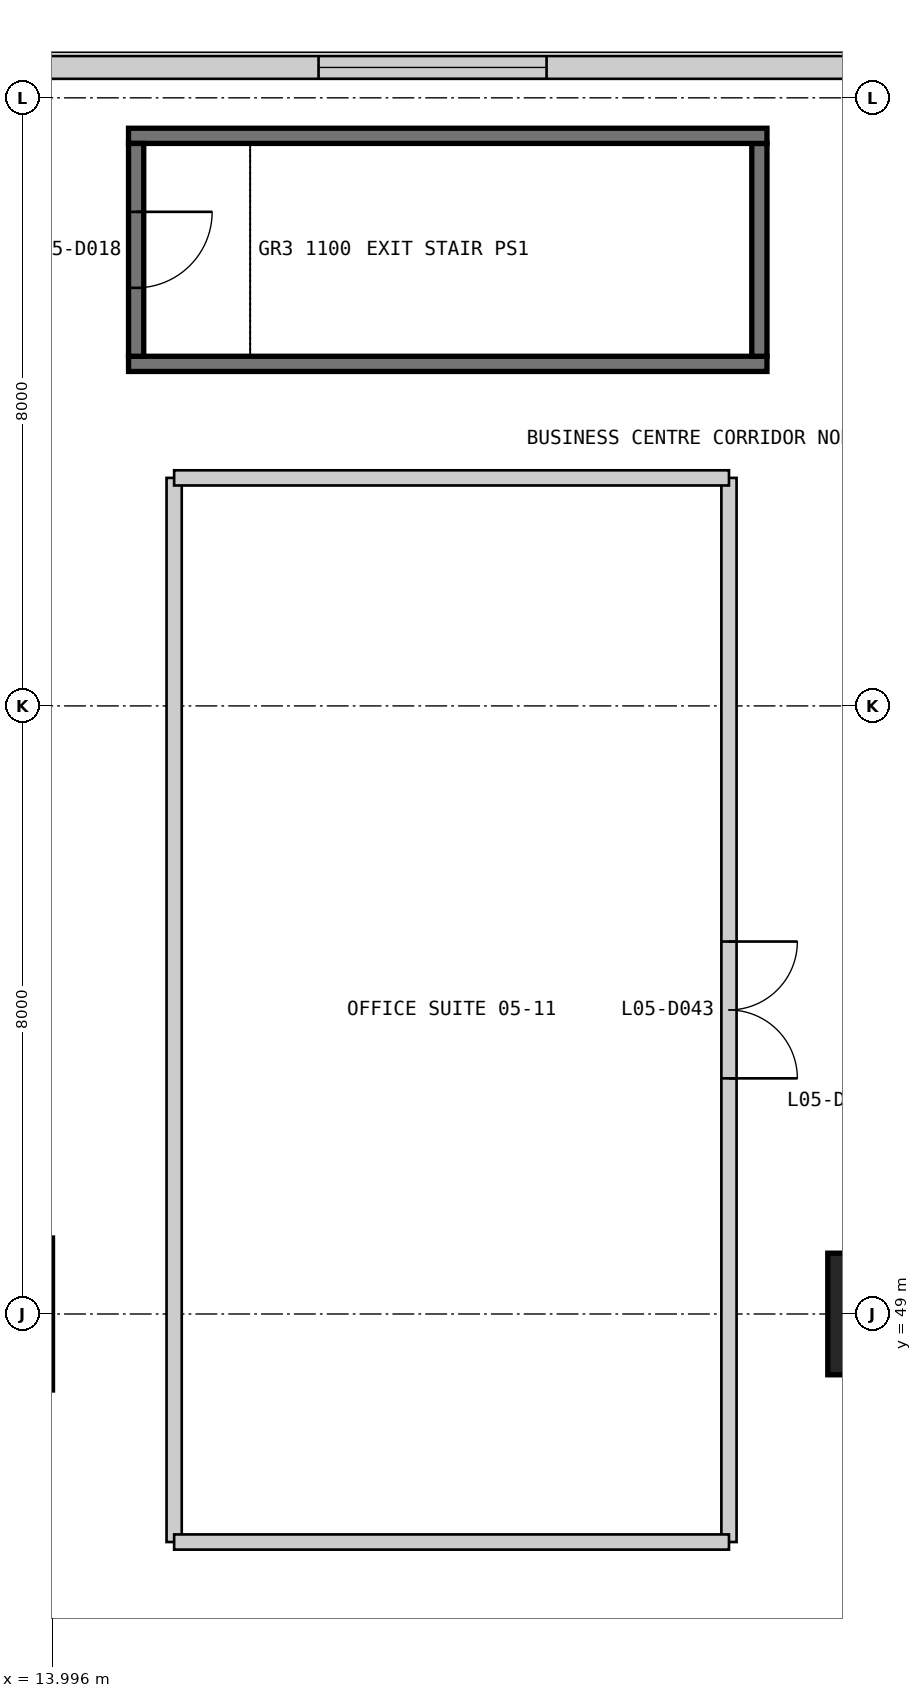
"""IFC4 building model, lengths in metres.
Left out: names, types, materials, properties, quantities, classifications, styles, units other than length and angle.
Written with IfcOpenShell. Run it as: python <this file> out.ifc"""

import sys

from ifc_helpers import new_model, si_unit, direction, frame, frame_2d, origin, origin_2d, place, context, subcontext, project, spatial, rectangle, extrude, element, fill, save


model = new_model("IFC4")
c1 = context("Model", 3, precision=1e-05, world=origin(), true_north=direction((0.0, 1.0)))
c2 = subcontext(c1, "Body", "Model", "MODEL_VIEW")
j1 = project(units=[si_unit("LENGTHUNIT", "METRE"), si_unit("PLANEANGLEUNIT", "RADIAN")], contexts=[c1])
p1 = place(None, origin())
s1 = spatial("IfcSite", under=j1, at=p1, CompositionType="ELEMENT")
p2 = place(p1, origin())
s2 = spatial("IfcBuilding", under=s1, at=p2, CompositionType="ELEMENT")
p3 = place(p2, frame((0.0, 0.0, 26.2)))
s3 = spatial("IfcBuildingStorey", under=s2, at=p3, CompositionType="ELEMENT", Elevation=26.2)
p4 = place(p3, frame((25.0, 49.0, 0.0), z_axis=(0.0, 0.0, 1.0), x_axis=(1.0, 0.0, 0.0)))
e1 = element("IfcColumn", 1, at=p4, inside=s3, PredefinedType="COLUMN", context=c2, shape_type="SweptSolid", body=[
    extrude(rectangle(XDim=1.6, YDim=1.6, at=origin_2d()), origin(), (0.0, 0.0, 1.0), 4.8),
])
p5 = place(p3, frame((57.55, 65.4, 0.0), z_axis=(0.0, 0.0, 1.0), x_axis=(-1.0, 0.0, 0.0)))
e2 = element("IfcWall", 2, at=p5, inside=s3, PredefinedType="SOLIDWALL", context=c2, shape_type="SweptSolid", body=[
    extrude(rectangle(XDim=65.1, YDim=0.3, at=frame_2d((32.55, 0.0))), origin(), (0.0, 0.0, 1.0), 4.5),
])
p6 = place(p5, frame((59.05, 0.0, 0.9)))
e3 = element("IfcOpeningElement", 3, at=p6, cuts=e2, PredefinedType="OPENING", context=c2, shape_type="SweptSolid", body=[
    extrude(rectangle(XDim=3.0, YDim=2.4, at=frame_2d((1.5, 1.2))), frame((0.0, 0.16, 0.0), z_axis=(0.0, -1.0, 0.0), x_axis=(1.0, 0.0, 0.0)), (0.0, 0.0, 1.0), 0.32),
])
p7 = place(p5, frame((51.05, 0.0, 0.9)))
e4 = element("IfcOpeningElement", 4, at=p7, cuts=e2, PredefinedType="OPENING", context=c2, shape_type="SweptSolid", body=[
    extrude(rectangle(XDim=3.0, YDim=2.4, at=frame_2d((1.5, 1.2))), frame((0.0, 0.16, 0.0), z_axis=(0.0, -1.0, 0.0), x_axis=(1.0, 0.0, 0.0)), (0.0, 0.0, 1.0), 0.32),
])
p8 = place(p5, frame((37.05, 0.0, 0.9)))
e5 = element("IfcOpeningElement", 5, at=p8, cuts=e2, PredefinedType="OPENING", context=c2, shape_type="SweptSolid", body=[
    extrude(rectangle(XDim=3.0, YDim=2.4, at=frame_2d((1.5, 1.2))), frame((0.0, 0.16, 0.0), z_axis=(0.0, -1.0, 0.0), x_axis=(1.0, 0.0, 0.0)), (0.0, 0.0, 1.0), 0.32),
])
p9 = place(p5, frame((25.05, 0.0, 0.9)))
e6 = element("IfcOpeningElement", 6, at=p9, cuts=e2, PredefinedType="OPENING", context=c2, shape_type="SweptSolid", body=[
    extrude(rectangle(XDim=3.0, YDim=2.4, at=frame_2d((1.5, 1.2))), frame((0.0, 0.16, 0.0), z_axis=(0.0, -1.0, 0.0), x_axis=(1.0, 0.0, 0.0)), (0.0, 0.0, 1.0), 0.32),
])
p10 = place(p5, frame((16.55, 0.0, 0.9)))
e7 = element("IfcOpeningElement", 7, at=p10, cuts=e2, PredefinedType="OPENING", context=c2, shape_type="SweptSolid", body=[
    extrude(rectangle(XDim=3.0, YDim=2.4, at=frame_2d((1.5, 1.2))), frame((0.0, 0.16, 0.0), z_axis=(0.0, -1.0, 0.0), x_axis=(1.0, 0.0, 0.0)), (0.0, 0.0, 1.0), 0.32),
])
p11 = place(p5, frame((10.55, 0.0, 0.9)))
e8 = element("IfcOpeningElement", 8, at=p11, cuts=e2, PredefinedType="OPENING", context=c2, shape_type="SweptSolid", body=[
    extrude(rectangle(XDim=3.0, YDim=2.4, at=frame_2d((1.5, 1.2))), frame((0.0, 0.16, 0.0), z_axis=(0.0, -1.0, 0.0), x_axis=(1.0, 0.0, 0.0)), (0.0, 0.0, 1.0), 0.32),
])
p12 = place(p5, frame((3.05, 0.0, 0.9)))
e9 = element("IfcOpeningElement", 9, at=p12, cuts=e2, PredefinedType="OPENING", context=c2, shape_type="SweptSolid", body=[
    extrude(rectangle(XDim=3.0, YDim=2.4, at=frame_2d((1.5, 1.2))), frame((0.0, 0.16, 0.0), z_axis=(0.0, -1.0, 0.0), x_axis=(1.0, 0.0, 0.0)), (0.0, 0.0, 1.0), 0.32),
])
p13 = place(p3, frame((15.0, 61.5, 0.0), z_axis=(0.0, 0.0, 1.0), x_axis=(1.0, 0.0, 0.0)))
e10 = element("IfcWall", 10, at=p13, inside=s3, PredefinedType="SOLIDWALL", context=c2, shape_type="SweptSolid", body=[
    extrude(rectangle(XDim=8.4, YDim=0.2, at=frame_2d((4.2, 0.0))), origin(), (0.0, 0.0, 1.0), 4.8),
])
p14 = place(p3, frame((23.3, 61.6, 0.0), z_axis=(0.0, 0.0, 1.0), x_axis=(0.0, 1.0, 0.0)))
e11 = element("IfcWall", 11, at=p14, inside=s3, PredefinedType="SOLIDWALL", context=c2, shape_type="SweptSolid", body=[
    extrude(rectangle(XDim=2.8, YDim=0.2, at=frame_2d((1.4, 0.0))), origin(), (0.0, 0.0, 1.0), 4.8),
])
p15 = place(p3, frame((23.4, 64.5, 0.0), z_axis=(0.0, 0.0, 1.0), x_axis=(-1.0, 0.0, 0.0)))
e12 = element("IfcWall", 12, at=p15, inside=s3, PredefinedType="SOLIDWALL", context=c2, shape_type="SweptSolid", body=[
    extrude(rectangle(XDim=8.4, YDim=0.2, at=frame_2d((4.2, 0.0))), origin(), (0.0, 0.0, 1.0), 4.8),
])
p16 = place(p3, frame((15.1, 64.4, 0.0), z_axis=(0.0, 0.0, 1.0), x_axis=(0.0, -1.0, 0.0)))
e13 = element("IfcWall", 13, at=p16, inside=s3, PredefinedType="SOLIDWALL", context=c2, shape_type="SweptSolid", body=[
    extrude(rectangle(XDim=2.8, YDim=0.2, at=frame_2d((1.4, 0.0))), origin(), (0.0, 0.0, 1.0), 4.8),
])
p17 = place(p16, frame((0.9, 0.0, 0.0)))
e14 = element("IfcOpeningElement", 14, at=p17, cuts=e13, PredefinedType="OPENING", context=c2, shape_type="SweptSolid", body=[
    extrude(rectangle(XDim=1.0, YDim=2.2, at=frame_2d((0.5, 1.1))), frame((0.0, 0.11, 0.0), z_axis=(0.0, -1.0, 0.0), x_axis=(1.0, 0.0, 0.0)), (0.0, 0.0, 1.0), 0.22),
])
p18 = place(p3, frame((15.6, 46.0, 0.0), z_axis=(0.0, 0.0, 1.0), x_axis=(0.0, 1.0, 0.0)))
e15 = element("IfcWall", 15, at=p18, inside=s3, PredefinedType="PARTITIONING", context=c2, shape_type="SweptSolid", body=[
    extrude(rectangle(XDim=14.0, YDim=0.2, at=frame_2d((7.0, 0.0))), origin(), (0.0, 0.0, 1.0), 4.5),
])
p19 = place(p3, frame((22.9, 46.0, 0.0), z_axis=(0.0, 0.0, 1.0), x_axis=(0.0, 1.0, 0.0)))
e16 = element("IfcWall", 16, at=p19, inside=s3, PredefinedType="PARTITIONING", context=c2, shape_type="SweptSolid", body=[
    extrude(rectangle(XDim=14.0, YDim=0.2, at=frame_2d((7.0, 0.0))), origin(), (0.0, 0.0, 1.0), 4.5),
])
p20 = place(p19, frame((6.1, 0.0, 0.0)))
e17 = element("IfcOpeningElement", 17, at=p20, cuts=e16, PredefinedType="OPENING", context=c2, shape_type="SweptSolid", body=[
    extrude(rectangle(XDim=1.8, YDim=2.4, at=frame_2d((0.9, 1.2))), frame((0.0, 0.11, 0.0), z_axis=(0.0, -1.0, 0.0), x_axis=(1.0, 0.0, 0.0)), (0.0, 0.0, 1.0), 0.22),
])
for number, where, z_axis, x_axis in (
    (18, (15.6, 46.0, 0.0), (0.0, 0.0, 1.0), (1.0, 0.0, 0.0)),
    (19, (15.6, 60.0, 0.0), (0.0, 0.0, 1.0), (1.0, 0.0, 0.0)),
):
    element("IfcWall", number, at=place(p3, frame(where, z_axis=z_axis, x_axis=x_axis)), inside=s3, PredefinedType="PARTITIONING", context=c2, shape_type="SweptSolid", body=[
        extrude(rectangle(XDim=7.3, YDim=0.2, at=frame_2d((3.65, 0.0))), origin(), (0.0, 0.0, 1.0), 4.5),
    ])
p21 = place(p8, origin())
e20 = element("IfcWindow", 20, at=p21, inside=s3, PartitioningType="SINGLE_PANEL", PredefinedType="WINDOW", context=c2, shape_type="SweptSolid", body=[
    extrude(rectangle(XDim=3.0, YDim=2.4, at=frame_2d((1.5, 1.2))), frame((0.0, 0.03, 0.0), z_axis=(0.0, -1.0, 0.0), x_axis=(1.0, 0.0, 0.0)), (0.0, 0.0, 1.0), 0.06),
])
fill(e5, e20)
p22 = place(p17, origin())
e21 = element("IfcDoor", 21, at=p22, inside=s3, OperationType="SINGLE_SWING_LEFT", PredefinedType="DOOR", context=c2, shape_type="SweptSolid", body=[
    extrude(rectangle(XDim=1.0, YDim=2.2, at=frame_2d((0.5, 1.1))), frame((0.0, 0.025, 0.0), z_axis=(0.0, -1.0, 0.0), x_axis=(1.0, 0.0, 0.0)), (0.0, 0.0, 1.0), 0.05),
])
fill(e14, e21)
p23 = place(p20, frame((1.8, 0.0, 0.0), z_axis=(0.0, 0.0, 1.0), x_axis=(-1.0, 0.0, 0.0)))
e22 = element("IfcDoor", 22, at=p23, inside=s3, OperationType="DOUBLE_DOOR_SINGLE_SWING", PredefinedType="DOOR", context=c2, shape_type="SweptSolid", body=[
    extrude(rectangle(XDim=1.8, YDim=2.4, at=frame_2d((0.9, 1.2))), frame((0.0, 0.025, 0.0), z_axis=(0.0, -1.0, 0.0), x_axis=(1.0, 0.0, 0.0)), (0.0, 0.0, 1.0), 0.05),
])
fill(e17, e22)
save(model, sys.argv[1])
